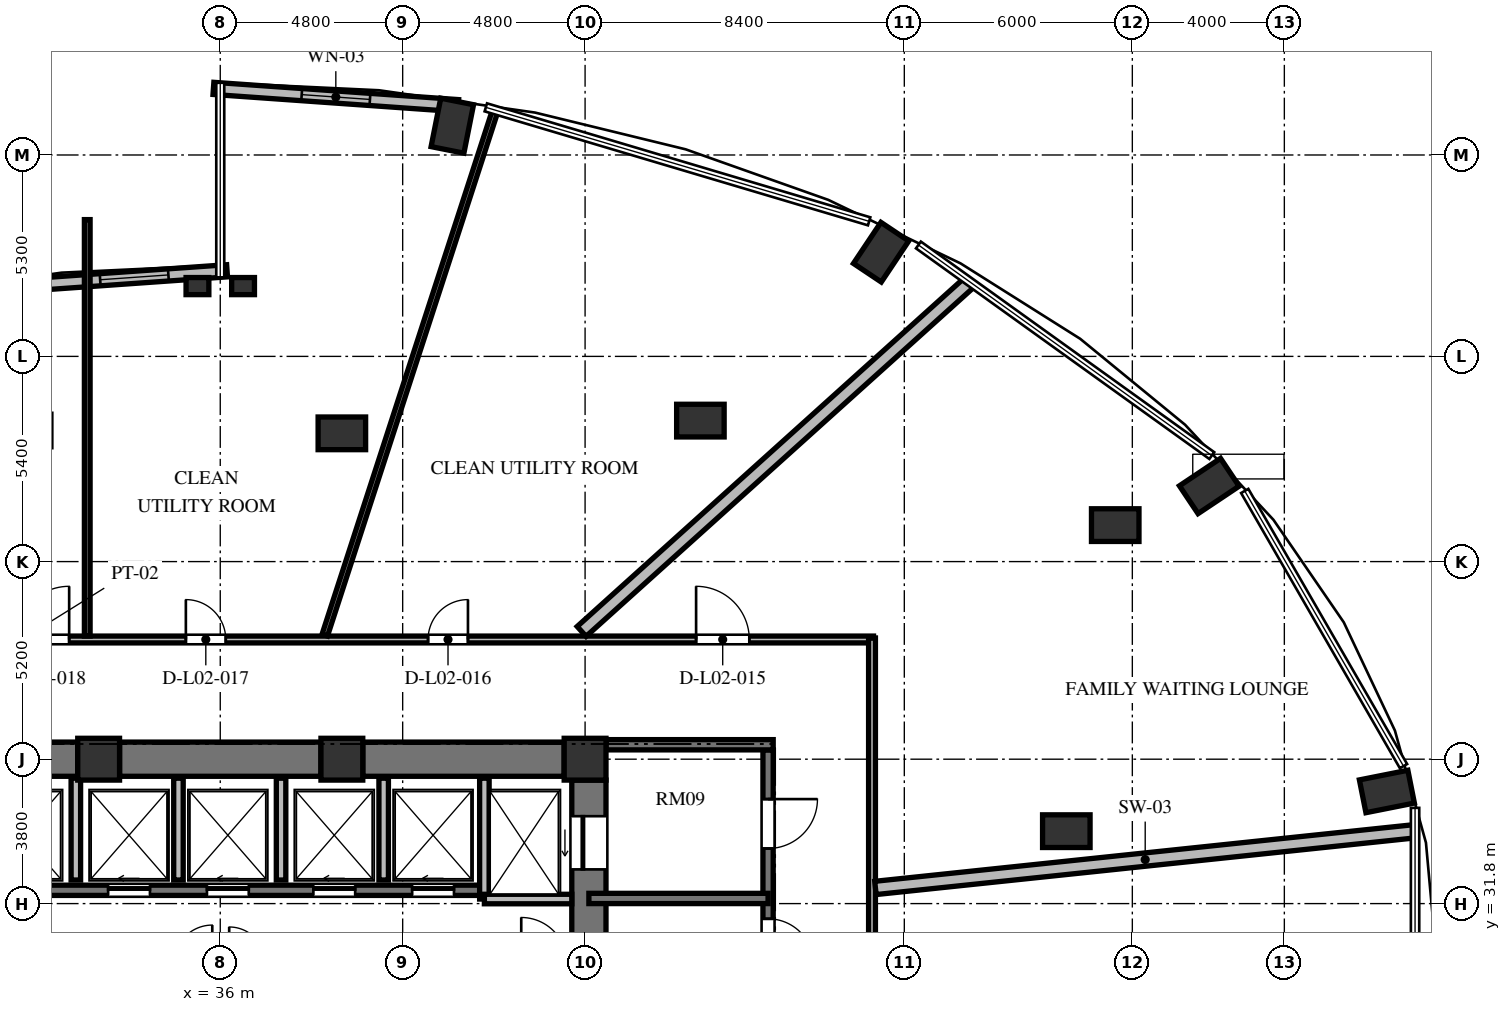
"""IFC4 building model, lengths in metres.
Left out: names, types, materials, properties, quantities, classifications, styles, units other than length and angle.
Written with IfcOpenShell. Run it as: python <this file> out.ifc"""

import sys

from ifc_helpers import new_model, si_unit, direction, frame, frame_2d, origin, origin_2d, place, context, subcontext, project, spatial, rectangle, extrude, element, fill, save


model = new_model("IFC4")
c1 = context("Model", 3, precision=1e-05, world=origin(), true_north=direction((0.0, 1.0)))
c2 = subcontext(c1, "Body", "Model", "MODEL_VIEW")
j1 = project(units=[si_unit("LENGTHUNIT", "METRE"), si_unit("PLANEANGLEUNIT", "RADIAN")], contexts=[c1])
p1 = place(None, origin())
s1 = spatial("IfcSite", under=j1, at=p1, CompositionType="ELEMENT")
p2 = place(p1, origin())
s2 = spatial("IfcBuilding", under=s1, at=p2, CompositionType="ELEMENT")
p3 = place(p2, frame((0.0, 0.0, 10.8)))
s3 = spatial("IfcBuildingStorey", under=s2, at=p3, CompositionType="ELEMENT", Elevation=10.8)
for number, where, z_axis, x_axis in (
    (1, (66.698, 34.75, 0.0), (0.0, 0.0, 1.0), (0.981, 0.195, 0.0)),
    (2, (62.025, 42.789, 0.0), (0.0, 0.0, 1.0), (0.831, 0.556, 0.0)),
    (3, (53.389, 48.942, 0.0), (0.0, 0.0, 1.0), (0.556, 0.831, 0.0)),
    (4, (42.106, 52.271, 0.0), (0.0, 0.0, 1.0), (0.195, 0.981, 0.0)),
):
    element("IfcColumn", number, at=place(p3, frame(where, z_axis=z_axis, x_axis=x_axis)), inside=s3, PredefinedType="COLUMN", context=c2, shape_type="SweptSolid", body=[
        extrude(rectangle(XDim=1.3, YDim=0.88, at=origin_2d()), origin(), (0.0, 0.0, 1.0), 4.8),
    ])
for number, where, z_axis, x_axis in (
    (5, (45.6, 35.6, 0.0), (0.0, 0.0, 1.0), (1.0, 0.0, 0.0)),
    (6, (39.2, 35.6, 0.0), (0.0, 0.0, 1.0), (1.0, 0.0, 0.0)),
    (7, (32.8, 35.6, 0.0), (0.0, 0.0, 1.0), (1.0, 0.0, 0.0)),
):
    element("IfcColumn", number, at=place(p3, frame(where, z_axis=z_axis, x_axis=x_axis)), inside=s3, PredefinedType="COLUMN", context=c2, shape_type="SweptSolid", body=[
        extrude(rectangle(XDim=1.1, YDim=1.1, at=origin_2d()), origin(), (0.0, 0.0, 1.0), 4.8),
    ])
for number, where, z_axis, x_axis in (
    (8, (58.263, 33.706, 0.0), (0.0, 0.0, 1.0), (1.0, 0.0, 0.0)),
    (9, (59.55, 41.76, 0.0), (0.0, 0.0, 1.0), (1.0, 0.0, 0.0)),
    (10, (48.634, 44.51, 0.0), (0.0, 0.0, 1.0), (1.0, 0.0, 0.0)),
    (11, (39.2, 44.175, 0.0), (0.0, 0.0, 1.0), (1.0, 0.0, 0.0)),
):
    element("IfcColumn", number, at=place(p3, frame(where, z_axis=z_axis, x_axis=x_axis)), inside=s3, PredefinedType="COLUMN", context=c2, shape_type="SweptSolid", body=[
        extrude(rectangle(XDim=1.25, YDim=0.86, at=origin_2d()), origin(), (0.0, 0.0, 1.0), 4.8),
    ])
for number, where, z_axis, x_axis in (
    (12, (35.4, 48.05, 0.0), (0.0, 0.0, 1.0), (1.0, 0.0, 0.0)),
    (13, (36.6, 48.05, 0.0), (0.0, 0.0, 1.0), (1.0, 0.0, 0.0)),
):
    element("IfcColumn", number, at=place(p3, frame(where, z_axis=z_axis, x_axis=x_axis)), inside=s3, PredefinedType="PILASTER", context=c2, shape_type="SweptSolid", body=[
        extrude(rectangle(XDim=0.6, YDim=0.45, at=origin_2d()), origin(), (0.0, 0.0, 1.0), 4.8),
    ])
p4 = place(p3, frame((45.7, 20.95, 0.0), z_axis=(0.0, 0.0, 1.0), x_axis=(0.0, 1.0, 0.0)))
e14 = element("IfcWall", 14, at=p4, inside=s3, PredefinedType="SHEAR", context=c2, shape_type="SweptSolid", body=[
    extrude(rectangle(XDim=14.1, YDim=0.9, at=frame_2d((7.05, 0.0))), origin(), (0.0, 0.0, 1.0), 4.8),
])
p5 = place(p4, frame((11.75, 0.0, 0.0)))
e15 = element("IfcOpeningElement", 15, at=p5, cuts=e14, PredefinedType="OPENING", context=c2, shape_type="SweptSolid", body=[
    extrude(rectangle(XDim=1.4, YDim=2.3, at=frame_2d((0.7, 1.15))), frame((0.0, 0.46, 0.0), z_axis=(0.0, -1.0, 0.0), x_axis=(1.0, 0.0, 0.0)), (0.0, 0.0, 1.0), 0.92),
])
p6 = place(p4, frame((0.95, 0.0, 0.0)))
e16 = element("IfcOpeningElement", 16, at=p6, cuts=e14, PredefinedType="OPENING", context=c2, shape_type="SweptSolid", body=[
    extrude(rectangle(XDim=1.4, YDim=2.3, at=frame_2d((0.7, 1.15))), frame((0.0, 0.46, 0.0), z_axis=(0.0, -1.0, 0.0), x_axis=(1.0, 0.0, 0.0)), (0.0, 0.0, 1.0), 0.92),
])
p7 = place(p3, frame((26.95, 35.6, 0.0), z_axis=(0.0, 0.0, 1.0), x_axis=(1.0, 0.0, 0.0)))
e17 = element("IfcWall", 17, at=p7, inside=s3, PredefinedType="SHEAR", context=c2, shape_type="SweptSolid", body=[
    extrude(rectangle(XDim=5.3, YDim=0.9, at=frame_2d((2.65, 0.0))), origin(), (0.0, 0.0, 1.0), 4.8),
])
p8 = place(p3, frame((33.35, 35.6, 0.0), z_axis=(0.0, 0.0, 1.0), x_axis=(1.0, 0.0, 0.0)))
e18 = element("IfcWall", 18, at=p8, inside=s3, PredefinedType="SHEAR", context=c2, shape_type="SweptSolid", body=[
    extrude(rectangle(XDim=5.3, YDim=0.9, at=frame_2d((2.65, 0.0))), origin(), (0.0, 0.0, 1.0), 4.8),
])
p9 = place(p3, frame((39.75, 35.6, 0.0), z_axis=(0.0, 0.0, 1.0), x_axis=(1.0, 0.0, 0.0)))
e19 = element("IfcWall", 19, at=p9, inside=s3, PredefinedType="SHEAR", context=c2, shape_type="SweptSolid", body=[
    extrude(rectangle(XDim=5.3, YDim=0.9, at=frame_2d((2.65, 0.0))), origin(), (0.0, 0.0, 1.0), 4.8),
])
p10 = place(p3, frame((42.262, 52.798, 0.0), z_axis=(0.0, 0.0, 1.0), x_axis=(-0.99751367159, 0.070473221795, 0.0)))
e20 = element("IfcWall", 20, at=p10, inside=s3, PredefinedType="SOLIDWALL", context=c2, shape_type="SweptSolid", body=[
    extrude(rectangle(XDim=6.458, YDim=0.32, at=frame_2d((3.229, 0.0))), origin(), (0.0, 0.0, 1.0), 4.52),
])
p11 = place(p10, frame((2.329, 0.0, 0.85)))
e21 = element("IfcOpeningElement", 21, at=p11, cuts=e20, PredefinedType="OPENING", context=c2, shape_type="SweptSolid", body=[
    extrude(rectangle(XDim=1.8, YDim=2.4, at=frame_2d((0.9, 1.2))), frame((0.0, 0.17, 0.0), z_axis=(0.0, -1.0, 0.0), x_axis=(1.0, 0.0, 0.0)), (0.0, 0.0, 1.0), 0.34),
])
p12 = place(p3, frame((36.179, 48.453, 0.0), z_axis=(0.0, 0.0, 1.0), x_axis=(-0.997513108184, -0.070481196075, 0.0)))
e22 = element("IfcWall", 22, at=p12, inside=s3, PredefinedType="SOLIDWALL", context=c2, shape_type="SweptSolid", body=[
    extrude(rectangle(XDim=6.457, YDim=0.32, at=frame_2d((3.229, 0.0))), origin(), (0.0, 0.0, 1.0), 4.52),
])
p13 = place(p12, frame((1.548, 0.0, 0.85)))
e23 = element("IfcOpeningElement", 23, at=p13, cuts=e22, PredefinedType="OPENING", context=c2, shape_type="SweptSolid", body=[
    extrude(rectangle(XDim=1.8, YDim=2.4, at=frame_2d((0.9, 1.2))), frame((0.0, 0.17, 0.0), z_axis=(0.0, -1.0, 0.0), x_axis=(1.0, 0.0, 0.0)), (0.0, 0.0, 1.0), 0.34),
])
p14 = place(p3, frame((26.55, 32.15, 0.0), z_axis=(0.0, 0.0, 1.0), x_axis=(1.0, 0.0, 0.0)))
e24 = element("IfcWall", 24, at=p14, inside=s3, PredefinedType="SHEAR", context=c2, shape_type="SweptSolid", body=[
    extrude(rectangle(XDim=16.4, YDim=0.27, at=frame_2d((8.2, 0.0))), origin(), (0.0, 0.0, 1.0), 4.8),
])
p15 = place(p14, frame((1.1, 0.0, 0.0)))
e25 = element("IfcOpeningElement", 25, at=p15, cuts=e24, PredefinedType="OPENING", context=c2, shape_type="SweptSolid", body=[
    extrude(rectangle(XDim=1.1, YDim=2.2, at=frame_2d((0.55, 1.1))), frame((0.0, 0.145, 0.0), z_axis=(0.0, -1.0, 0.0), x_axis=(1.0, 0.0, 0.0)), (0.0, 0.0, 1.0), 0.29),
])
p16 = place(p14, frame((3.7, 0.0, 0.0)))
e26 = element("IfcOpeningElement", 26, at=p16, cuts=e24, PredefinedType="OPENING", context=c2, shape_type="SweptSolid", body=[
    extrude(rectangle(XDim=1.1, YDim=2.2, at=frame_2d((0.55, 1.1))), frame((0.0, 0.145, 0.0), z_axis=(0.0, -1.0, 0.0), x_axis=(1.0, 0.0, 0.0)), (0.0, 0.0, 1.0), 0.29),
])
p17 = place(p14, frame((6.5, 0.0, 0.0)))
e27 = element("IfcOpeningElement", 27, at=p17, cuts=e24, PredefinedType="OPENING", context=c2, shape_type="SweptSolid", body=[
    extrude(rectangle(XDim=1.1, YDim=2.2, at=frame_2d((0.55, 1.1))), frame((0.0, 0.145, 0.0), z_axis=(0.0, -1.0, 0.0), x_axis=(1.0, 0.0, 0.0)), (0.0, 0.0, 1.0), 0.29),
])
p18 = place(p14, frame((9.1, 0.0, 0.0)))
e28 = element("IfcOpeningElement", 28, at=p18, cuts=e24, PredefinedType="OPENING", context=c2, shape_type="SweptSolid", body=[
    extrude(rectangle(XDim=1.1, YDim=2.2, at=frame_2d((0.55, 1.1))), frame((0.0, 0.145, 0.0), z_axis=(0.0, -1.0, 0.0), x_axis=(1.0, 0.0, 0.0)), (0.0, 0.0, 1.0), 0.29),
])
p19 = place(p14, frame((11.9, 0.0, 0.0)))
e29 = element("IfcOpeningElement", 29, at=p19, cuts=e24, PredefinedType="OPENING", context=c2, shape_type="SweptSolid", body=[
    extrude(rectangle(XDim=1.1, YDim=2.2, at=frame_2d((0.55, 1.1))), frame((0.0, 0.145, 0.0), z_axis=(0.0, -1.0, 0.0), x_axis=(1.0, 0.0, 0.0)), (0.0, 0.0, 1.0), 0.29),
])
p20 = place(p14, frame((14.5, 0.0, 0.0)))
e30 = element("IfcOpeningElement", 30, at=p20, cuts=e24, PredefinedType="OPENING", context=c2, shape_type="SweptSolid", body=[
    extrude(rectangle(XDim=1.1, YDim=2.2, at=frame_2d((0.55, 1.1))), frame((0.0, 0.145, 0.0), z_axis=(0.0, -1.0, 0.0), x_axis=(1.0, 0.0, 0.0)), (0.0, 0.0, 1.0), 0.29),
])
p21 = place(p3, frame((42.95, 31.92, 0.0), z_axis=(0.0, 0.0, 1.0), x_axis=(0.0, 1.0, 0.0)))
e31 = element("IfcWall", 31, at=p21, inside=s3, PredefinedType="SOLIDWALL", context=c2, shape_type="SweptSolid", body=[
    extrude(rectangle(XDim=3.18, YDim=0.25, at=frame_2d((1.59, 0.0))), origin(), (0.0, 0.0, 1.0), 4.52),
])
p22 = place(p3, frame((42.95, 31.92, 0.0), z_axis=(0.0, 0.0, 1.0), x_axis=(1.0, 0.0, 0.0)))
e32 = element("IfcWall", 32, at=p22, inside=s3, PredefinedType="SOLIDWALL", context=c2, shape_type="SweptSolid", body=[
    extrude(rectangle(XDim=2.3, YDim=0.25, at=frame_2d((1.15, 0.0))), origin(), (0.0, 0.0, 1.0), 4.52),
])
for number, where, z_axis, x_axis in (
    (33, (32.2, 32.42, 0.0), (0.0, 0.0, 1.0), (0.0, 1.0, 0.0)),
    (34, (34.9, 32.42, 0.0), (0.0, 0.0, 1.0), (0.0, 1.0, 0.0)),
    (35, (37.6, 32.42, 0.0), (0.0, 0.0, 1.0), (0.0, 1.0, 0.0)),
    (36, (40.3, 32.42, 0.0), (0.0, 0.0, 1.0), (0.0, 1.0, 0.0)),
):
    element("IfcWall", number, at=place(p3, frame(where, z_axis=z_axis, x_axis=x_axis)), inside=s3, PredefinedType="SOLIDWALL", context=c2, shape_type="SweptSolid", body=[
        extrude(rectangle(XDim=2.68, YDim=0.25, at=frame_2d((1.34, 0.0))), origin(), (0.0, 0.0, 1.0), 4.52),
    ])
p23 = place(p3, frame((50.415, 35.845, 0.0), z_axis=(0.0, 0.0, 1.0), x_axis=(0.0, -1.0, 0.0)))
e37 = element("IfcWall", 37, at=p23, inside=s3, PredefinedType="SHEAR", context=c2, shape_type="SweptSolid", body=[
    extrude(rectangle(XDim=15.825, YDim=0.27, at=frame_2d((7.913, 0.0))), origin(), (0.0, 0.0, 1.0), 4.8),
])
p24 = place(p23, frame((4.445, 0.0, 0.0)))
e38 = element("IfcOpeningElement", 38, at=p24, cuts=e37, PredefinedType="OPENING", context=c2, shape_type="SweptSolid", body=[
    extrude(rectangle(XDim=1.2, YDim=2.15, at=frame_2d((0.6, 1.075))), frame((0.0, 0.145, 0.0), z_axis=(0.0, -1.0, 0.0), x_axis=(1.0, 0.0, 0.0)), (0.0, 0.0, 1.0), 0.29),
])
p25 = place(p23, frame((1.295, 0.0, 0.0)))
e39 = element("IfcOpeningElement", 39, at=p25, cuts=e37, PredefinedType="OPENING", context=c2, shape_type="SweptSolid", body=[
    extrude(rectangle(XDim=1.3, YDim=2.2, at=frame_2d((0.65, 1.1))), frame((0.0, 0.145, 0.0), z_axis=(0.0, -1.0, 0.0), x_axis=(1.0, 0.0, 0.0)), (0.0, 0.0, 1.0), 0.29),
])
p26 = place(p23, frame((13.095, 0.0, 0.0)))
e40 = element("IfcOpeningElement", 40, at=p26, cuts=e37, PredefinedType="OPENING", context=c2, shape_type="SweptSolid", body=[
    extrude(rectangle(XDim=1.3, YDim=2.2, at=frame_2d((0.65, 1.1))), frame((0.0, 0.145, 0.0), z_axis=(0.0, -1.0, 0.0), x_axis=(1.0, 0.0, 0.0)), (0.0, 0.0, 1.0), 0.29),
])
p27 = place(p3, frame((46.15, 35.98, 0.0), z_axis=(0.0, 0.0, 1.0), x_axis=(1.0, 0.0, 0.0)))
e41 = element("IfcWall", 41, at=p27, inside=s3, PredefinedType="SHEAR", context=c2, shape_type="SweptSolid", body=[
    extrude(rectangle(XDim=4.4, YDim=0.27, at=frame_2d((2.2, 0.0))), origin(), (0.0, 0.0, 1.0), 4.8),
])
p28 = place(p3, frame((45.7, 31.935, 0.0), z_axis=(0.0, 0.0, 1.0), x_axis=(1.0, 0.0, 0.0)))
e42 = element("IfcWall", 42, at=p28, inside=s3, PredefinedType="SHEAR", context=c2, shape_type="SweptSolid", body=[
    extrude(rectangle(XDim=4.715, YDim=0.27, at=frame_2d((2.357, 0.0))), origin(), (0.0, 0.0, 1.0), 4.8),
])
p29 = place(p3, frame((23.31, 38.75, 0.0), z_axis=(0.0, 0.0, 1.0), x_axis=(1.0, 0.0, 0.0)))
e43 = element("IfcWall", 43, at=p29, inside=s3, PredefinedType="PARTITIONING", context=c2, shape_type="SweptSolid", body=[
    extrude(rectangle(XDim=29.88, YDim=0.18, at=frame_2d((14.94, 0.0))), origin(), (0.0, 0.0, 1.0), 4.52),
])
p30 = place(p29, frame((25.211, 0.0, 0.0)))
e44 = element("IfcOpeningElement", 44, at=p30, cuts=e43, PredefinedType="OPENING", context=c2, shape_type="SweptSolid", body=[
    extrude(rectangle(XDim=1.4, YDim=2.2, at=frame_2d((0.7, 1.1))), frame((0.0, 0.1, 0.0), z_axis=(0.0, -1.0, 0.0), x_axis=(1.0, 0.0, 0.0)), (0.0, 0.0, 1.0), 0.2),
])
p31 = place(p29, frame((18.158, 0.0, 0.0)))
e45 = element("IfcOpeningElement", 45, at=p31, cuts=e43, PredefinedType="OPENING", context=c2, shape_type="SweptSolid", body=[
    extrude(rectangle(XDim=1.05, YDim=2.15, at=frame_2d((0.525, 1.075))), frame((0.0, 0.1, 0.0), z_axis=(0.0, -1.0, 0.0), x_axis=(1.0, 0.0, 0.0)), (0.0, 0.0, 1.0), 0.2),
])
p32 = place(p29, frame((11.785, 0.0, 0.0)))
e46 = element("IfcOpeningElement", 46, at=p32, cuts=e43, PredefinedType="OPENING", context=c2, shape_type="SweptSolid", body=[
    extrude(rectangle(XDim=1.05, YDim=2.15, at=frame_2d((0.525, 1.075))), frame((0.0, 0.1, 0.0), z_axis=(0.0, -1.0, 0.0), x_axis=(1.0, 0.0, 0.0)), (0.0, 0.0, 1.0), 0.2),
])
p33 = place(p29, frame((7.314, 0.0, 0.0)))
e47 = element("IfcOpeningElement", 47, at=p33, cuts=e43, PredefinedType="OPENING", context=c2, shape_type="SweptSolid", body=[
    extrude(rectangle(XDim=1.4, YDim=2.2, at=frame_2d((0.7, 1.1))), frame((0.0, 0.1, 0.0), z_axis=(0.0, -1.0, 0.0), x_axis=(1.0, 0.0, 0.0)), (0.0, 0.0, 1.0), 0.2),
])
p34 = place(p29, frame((2.832, 0.0, 0.0)))
e48 = element("IfcOpeningElement", 48, at=p34, cuts=e43, PredefinedType="OPENING", context=c2, shape_type="SweptSolid", body=[
    extrude(rectangle(XDim=0.95, YDim=2.1, at=frame_2d((0.475, 1.05))), frame((0.0, 0.1, 0.0), z_axis=(0.0, -1.0, 0.0), x_axis=(1.0, 0.0, 0.0)), (0.0, 0.0, 1.0), 0.2),
])
p35 = place(p3, frame((53.15, 38.79, 0.0), z_axis=(0.0, 0.0, 1.0), x_axis=(0.0, -1.0, 0.0)))
e49 = element("IfcWall", 49, at=p35, inside=s3, PredefinedType="PARTITIONING", context=c2, shape_type="SweptSolid", body=[
    extrude(rectangle(XDim=9.43, YDim=0.18, at=frame_2d((4.715, 0.0))), origin(), (0.0, 0.0, 1.0), 4.205),
])
p36 = place(p3, frame((53.24, 32.212, 0.0), z_axis=(0.0, 0.0, 1.0), x_axis=(0.994522307274, 0.104524544177, 0.0)))
e50 = element("IfcWall", 50, at=p36, inside=s3, PredefinedType="SOLIDWALL", context=c2, shape_type="SweptSolid", body=[
    extrude(rectangle(XDim=14.276, YDim=0.35, at=frame_2d((7.138, 0.0))), origin(), (0.0, 0.0, 1.0), 4.52),
])
p37 = place(p3, frame((45.509, 38.962, 0.0), z_axis=(0.0, 0.0, 1.0), x_axis=(0.743143036481, 0.669132593236, 0.0)))
e51 = element("IfcWall", 51, at=p37, inside=s3, PredefinedType="SOLIDWALL", context=c2, shape_type="SweptSolid", body=[
    extrude(rectangle(XDim=13.739, YDim=0.35, at=frame_2d((6.87, 0.0))), origin(), (0.0, 0.0, 1.0), 4.52),
])
p38 = place(p3, frame((38.75, 38.862, 0.0), z_axis=(0.0, 0.0, 1.0), x_axis=(0.309009259577, 0.951059029449, 0.0)))
e52 = element("IfcWall", 52, at=p38, inside=s3, PredefinedType="PARTITIONING", context=c2, shape_type="SweptSolid", body=[
    extrude(rectangle(XDim=14.518, YDim=0.15, at=frame_2d((7.259, 0.0))), origin(), (0.0, 0.0, 1.0), 4.52),
])
p39 = place(p3, frame((32.5, 38.84, 0.0), z_axis=(0.0, 0.0, 1.0), x_axis=(0.0, 1.0, 0.0)))
e53 = element("IfcWall", 53, at=p39, inside=s3, PredefinedType="PARTITIONING", context=c2, shape_type="SweptSolid", body=[
    extrude(rectangle(XDim=10.959, YDim=0.15, at=frame_2d((5.48, 0.0))), origin(), (0.0, 0.0, 1.0), 4.52),
])
p40 = place(p11, origin())
e54 = element("IfcWindow", 54, at=p40, inside=s3, PartitioningType="SINGLE_PANEL", PredefinedType="WINDOW", context=c2, shape_type="SweptSolid", body=[
    extrude(rectangle(XDim=1.8, YDim=2.4, at=frame_2d((0.9, 1.2))), frame((0.0, 0.03, 0.0), z_axis=(0.0, -1.0, 0.0), x_axis=(1.0, 0.0, 0.0)), (0.0, 0.0, 1.0), 0.06),
])
fill(e21, e54)
p41 = place(p13, origin())
e55 = element("IfcWindow", 55, at=p41, inside=s3, PartitioningType="SINGLE_PANEL", PredefinedType="WINDOW", context=c2, shape_type="SweptSolid", body=[
    extrude(rectangle(XDim=1.8, YDim=2.4, at=frame_2d((0.9, 1.2))), frame((0.0, 0.03, 0.0), z_axis=(0.0, -1.0, 0.0), x_axis=(1.0, 0.0, 0.0)), (0.0, 0.0, 1.0), 0.06),
])
fill(e23, e55)
p42 = place(p17, origin())
e56 = element("IfcDoor", 56, at=p42, inside=s3, OperationType="SLIDING_TO_LEFT", PredefinedType="DOOR", context=c2, shape_type="SweptSolid", body=[
    extrude(rectangle(XDim=1.1, YDim=2.2, at=frame_2d((0.55, 1.1))), frame((0.0, 0.025, 0.0), z_axis=(0.0, -1.0, 0.0), x_axis=(1.0, 0.0, 0.0)), (0.0, 0.0, 1.0), 0.05),
])
fill(e27, e56)
p43 = place(p18, origin())
e57 = element("IfcDoor", 57, at=p43, inside=s3, OperationType="SLIDING_TO_LEFT", PredefinedType="DOOR", context=c2, shape_type="SweptSolid", body=[
    extrude(rectangle(XDim=1.1, YDim=2.2, at=frame_2d((0.55, 1.1))), frame((0.0, 0.025, 0.0), z_axis=(0.0, -1.0, 0.0), x_axis=(1.0, 0.0, 0.0)), (0.0, 0.0, 1.0), 0.05),
])
fill(e28, e57)
p44 = place(p19, origin())
e58 = element("IfcDoor", 58, at=p44, inside=s3, OperationType="SLIDING_TO_LEFT", PredefinedType="DOOR", context=c2, shape_type="SweptSolid", body=[
    extrude(rectangle(XDim=1.1, YDim=2.2, at=frame_2d((0.55, 1.1))), frame((0.0, 0.025, 0.0), z_axis=(0.0, -1.0, 0.0), x_axis=(1.0, 0.0, 0.0)), (0.0, 0.0, 1.0), 0.05),
])
fill(e29, e58)
p45 = place(p20, origin())
e59 = element("IfcDoor", 59, at=p45, inside=s3, OperationType="SLIDING_TO_LEFT", PredefinedType="DOOR", context=c2, shape_type="SweptSolid", body=[
    extrude(rectangle(XDim=1.1, YDim=2.2, at=frame_2d((0.55, 1.1))), frame((0.0, 0.025, 0.0), z_axis=(0.0, -1.0, 0.0), x_axis=(1.0, 0.0, 0.0)), (0.0, 0.0, 1.0), 0.05),
])
fill(e30, e59)
p46 = place(p5, origin())
e60 = element("IfcDoor", 60, at=p46, inside=s3, OperationType="SLIDING_TO_LEFT", PredefinedType="DOOR", context=c2, shape_type="SweptSolid", body=[
    extrude(rectangle(XDim=1.4, YDim=2.3, at=frame_2d((0.7, 1.15))), frame((0.0, 0.025, 0.0), z_axis=(0.0, -1.0, 0.0), x_axis=(1.0, 0.0, 0.0)), (0.0, 0.0, 1.0), 0.05),
])
fill(e15, e60)
p47 = place(p24, origin())
e61 = element("IfcDoor", 61, at=p47, inside=s3, OperationType="SINGLE_SWING_RIGHT", PredefinedType="DOOR", context=c2, shape_type="SweptSolid", body=[
    extrude(rectangle(XDim=1.2, YDim=2.15, at=frame_2d((0.6, 1.075))), frame((0.0, 0.025, 0.0), z_axis=(0.0, -1.0, 0.0), x_axis=(1.0, 0.0, 0.0)), (0.0, 0.0, 1.0), 0.05),
])
fill(e38, e61)
p48 = place(p25, origin())
e62 = element("IfcDoor", 62, at=p48, inside=s3, OperationType="SINGLE_SWING_LEFT", PredefinedType="DOOR", context=c2, shape_type="SweptSolid", body=[
    extrude(rectangle(XDim=1.3, YDim=2.2, at=frame_2d((0.65, 1.1))), frame((0.0, 0.025, 0.0), z_axis=(0.0, -1.0, 0.0), x_axis=(1.0, 0.0, 0.0)), (0.0, 0.0, 1.0), 0.05),
])
fill(e39, e62)
p49 = place(p30, origin())
e63 = element("IfcDoor", 63, at=p49, inside=s3, OperationType="SINGLE_SWING_LEFT", PredefinedType="DOOR", context=c2, shape_type="SweptSolid", body=[
    extrude(rectangle(XDim=1.4, YDim=2.2, at=frame_2d((0.7, 1.1))), frame((0.0, 0.025, 0.0), z_axis=(0.0, -1.0, 0.0), x_axis=(1.0, 0.0, 0.0)), (0.0, 0.0, 1.0), 0.05),
])
fill(e44, e63)
p50 = place(p31, origin())
e64 = element("IfcDoor", 64, at=p50, inside=s3, OperationType="SINGLE_SWING_RIGHT", PredefinedType="DOOR", context=c2, shape_type="SweptSolid", body=[
    extrude(rectangle(XDim=1.05, YDim=2.15, at=frame_2d((0.525, 1.075))), frame((0.0, 0.025, 0.0), z_axis=(0.0, -1.0, 0.0), x_axis=(1.0, 0.0, 0.0)), (0.0, 0.0, 1.0), 0.05),
])
fill(e45, e64)
p51 = place(p32, origin())
e65 = element("IfcDoor", 65, at=p51, inside=s3, OperationType="SINGLE_SWING_LEFT", PredefinedType="DOOR", context=c2, shape_type="SweptSolid", body=[
    extrude(rectangle(XDim=1.05, YDim=2.15, at=frame_2d((0.525, 1.075))), frame((0.0, 0.025, 0.0), z_axis=(0.0, -1.0, 0.0), x_axis=(1.0, 0.0, 0.0)), (0.0, 0.0, 1.0), 0.05),
])
fill(e46, e65)
p52 = place(p33, origin())
e66 = element("IfcDoor", 66, at=p52, inside=s3, OperationType="SINGLE_SWING_RIGHT", PredefinedType="DOOR", context=c2, shape_type="SweptSolid", body=[
    extrude(rectangle(XDim=1.4, YDim=2.2, at=frame_2d((0.7, 1.1))), frame((0.0, 0.025, 0.0), z_axis=(0.0, -1.0, 0.0), x_axis=(1.0, 0.0, 0.0)), (0.0, 0.0, 1.0), 0.05),
])
fill(e47, e66)
save(model, sys.argv[1])
